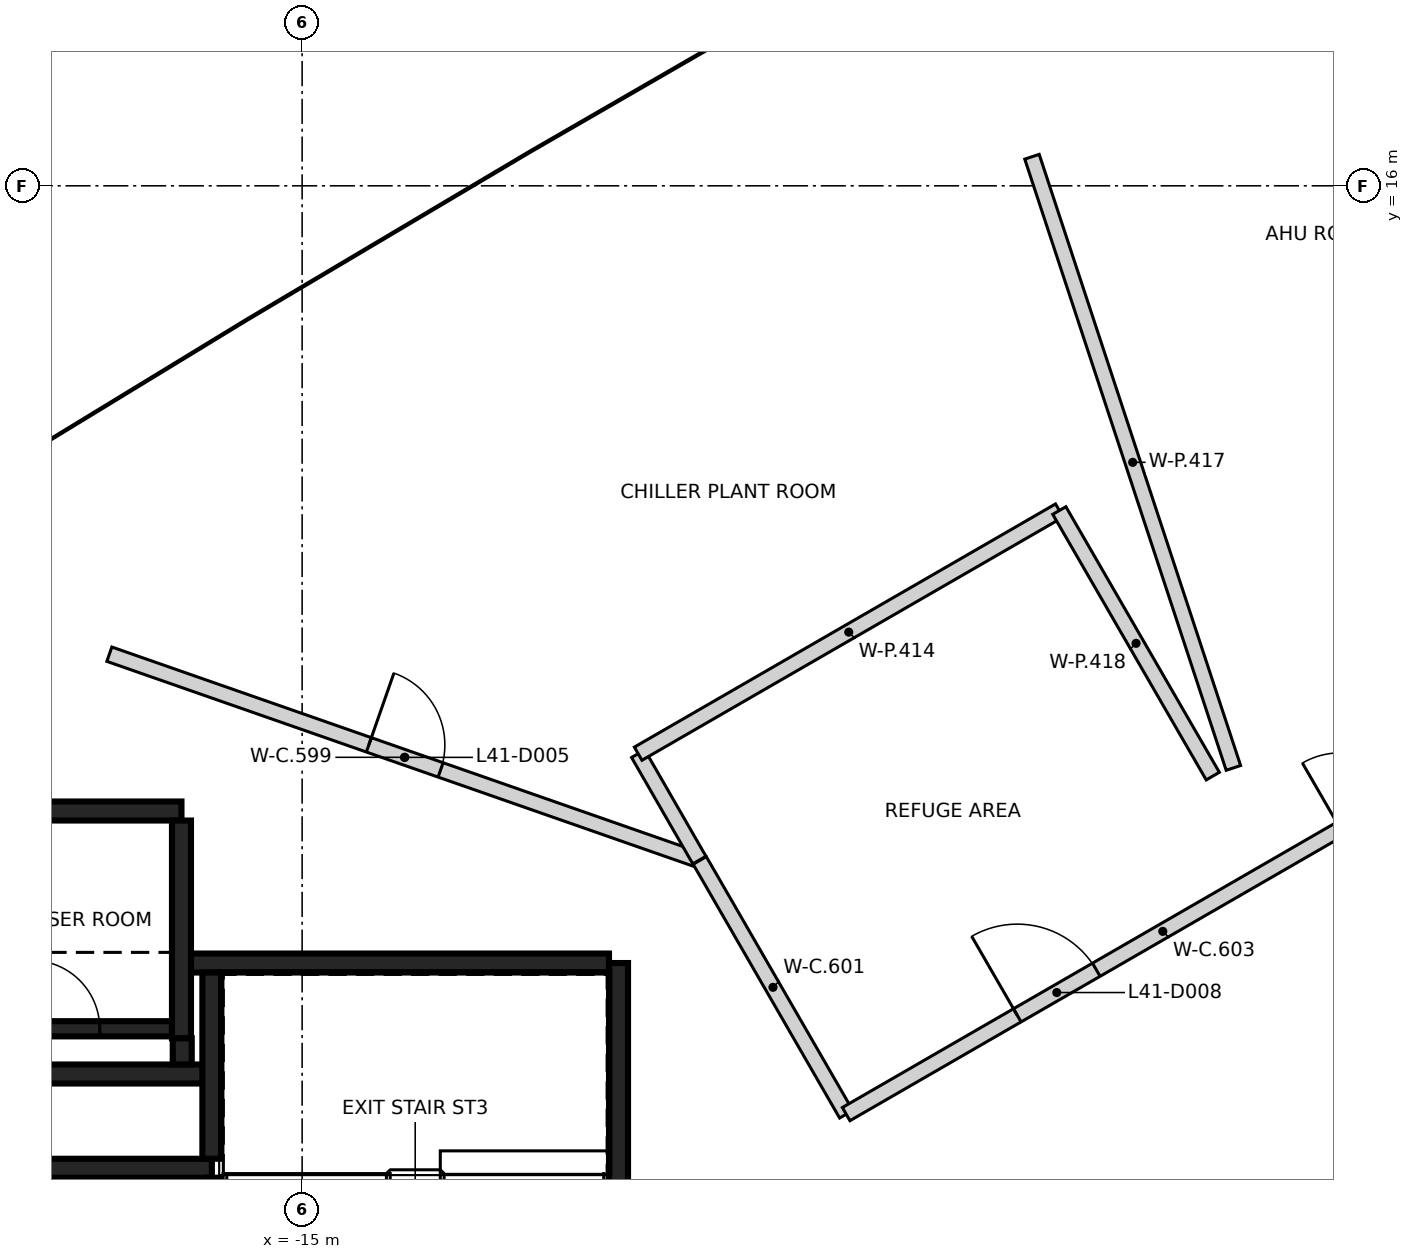
"""IFC4 building model, lengths in metres.
Left out: names, types, materials, properties, quantities, classifications, styles, units other than length and angle.
Written with IfcOpenShell. Run it as: python <this file> out.ifc"""

import sys

from ifc_helpers import new_model, si_unit, direction, frame, frame_2d, origin, place, context, subcontext, project, spatial, rectangle, extrude, element, fill, save


model = new_model("IFC4")
c1 = context("Model", 3, precision=1e-05, world=origin(), true_north=direction((0.0, 1.0)))
c2 = subcontext(c1, "Body", "Model", "MODEL_VIEW")
j1 = project(units=[si_unit("LENGTHUNIT", "METRE"), si_unit("PLANEANGLEUNIT", "RADIAN")], contexts=[c1])
p1 = place(None, origin())
s1 = spatial("IfcSite", under=j1, at=p1, CompositionType="ELEMENT")
p2 = place(p1, origin())
s2 = spatial("IfcBuilding", under=s1, at=p2, CompositionType="ELEMENT")
p3 = place(p2, frame((0.0, 0.0, 164.8)))
s3 = spatial("IfcBuildingStorey", under=s2, at=p3, CompositionType="ELEMENT", Elevation=164.8)
p4 = place(p3, frame((-10.837, 5.775, 0.0), z_axis=(0.0, 0.0, 1.0), x_axis=(0.0, -1.0, 0.0)))
e1 = element("IfcWall", 1, at=p4, inside=s3, PredefinedType="SHEAR", context=c2, shape_type="SweptSolid", body=[
    extrude(rectangle(XDim=11.55, YDim=0.25, at=frame_2d((5.775, 0.0))), origin(), (0.0, 0.0, 1.0), 4.45),
])
p5 = place(p4, frame((10.025, 0.0, 0.0)))
e2 = element("IfcOpeningElement", 2, at=p5, cuts=e1, PredefinedType="OPENING", context=c2, shape_type="SweptSolid", body=[
    extrude(rectangle(XDim=1.2, YDim=2.1, at=frame_2d((0.6, 1.05))), frame((0.0, 0.135, 0.0), z_axis=(0.0, -1.0, 0.0), x_axis=(1.0, 0.0, 0.0)), (0.0, 0.0, 1.0), 0.27),
])
p6 = place(p4, frame((8.725, 0.0, 0.0)))
e3 = element("IfcOpeningElement", 3, at=p6, cuts=e1, PredefinedType="OPENING", context=c2, shape_type="SweptSolid", body=[
    extrude(rectangle(XDim=1.2, YDim=2.1, at=frame_2d((0.6, 1.05))), frame((0.0, 0.135, 0.0), z_axis=(0.0, -1.0, 0.0), x_axis=(1.0, 0.0, 0.0)), (0.0, 0.0, 1.0), 0.27),
])
p7 = place(p3, frame((-16.472, 5.775, 0.0), z_axis=(0.0, 0.0, 1.0), x_axis=(1.0, 0.0, 0.0)))
e4 = element("IfcWall", 4, at=p7, inside=s3, PredefinedType="SHEAR", context=c2, shape_type="SweptSolid", body=[
    extrude(rectangle(XDim=5.51, YDim=0.25, at=frame_2d((2.755, 0.0))), origin(), (0.0, 0.0, 1.0), 4.45),
])
p8 = place(p3, frame((-19.387, 3.075, 0.0), z_axis=(0.0, 0.0, 1.0), x_axis=(1.0, 0.0, 0.0)))
e5 = element("IfcWall", 5, at=p8, inside=s3, PredefinedType="SHEAR", context=c2, shape_type="SweptSolid", body=[
    extrude(rectangle(XDim=3.2, YDim=0.25, at=frame_2d((1.6, 0.0))), origin(), (0.0, 0.0, 1.0), 4.45),
])
p9 = place(p3, frame((-19.637, 7.775, 0.0), z_axis=(0.0, 0.0, 1.0), x_axis=(1.0, 0.0, 0.0)))
e6 = element("IfcWall", 6, at=p9, inside=s3, PredefinedType="SHEAR", context=c2, shape_type="SweptSolid", body=[
    extrude(rectangle(XDim=3.05, YDim=0.25, at=frame_2d((1.525, 0.0))), origin(), (0.0, 0.0, 1.0), 4.45),
])
p10 = place(p3, frame((-16.587, 7.65, 0.0), z_axis=(0.0, 0.0, 1.0), x_axis=(0.0, -1.0, 0.0)))
e7 = element("IfcWall", 7, at=p10, inside=s3, PredefinedType="SHEAR", context=c2, shape_type="SweptSolid", body=[
    extrude(rectangle(XDim=2.865, YDim=0.25, at=frame_2d((1.432, 0.0))), origin(), (0.0, 0.0, 1.0), 4.45),
])
p11 = place(p3, frame((-16.302, 4.315, 0.0), z_axis=(0.0, 0.0, 1.0), x_axis=(-1.0, 0.0, 0.0)))
e8 = element("IfcWall", 8, at=p11, inside=s3, PredefinedType="SHEAR", context=c2, shape_type="SweptSolid", body=[
    extrude(rectangle(XDim=3.085, YDim=0.25, at=frame_2d((1.542, 0.0))), origin(), (0.0, 0.0, 1.0), 4.45),
])
p12 = place(p3, frame((-16.187, 3.2, 0.0), z_axis=(0.0, 0.0, 1.0), x_axis=(0.0, 1.0, 0.0)))
e9 = element("IfcWall", 9, at=p12, inside=s3, PredefinedType="SHEAR", context=c2, shape_type="SweptSolid", body=[
    extrude(rectangle(XDim=2.449, YDim=0.25, at=frame_2d((1.225, 0.0))), origin(), (0.0, 0.0, 1.0), 4.45),
])
p13 = place(p3, frame((-16.577, 4.785, 0.0), z_axis=(0.0, 0.0, 1.0), x_axis=(0.0, -1.0, 0.0)))
e10 = element("IfcWall", 10, at=p13, inside=s3, PredefinedType="SHEAR", context=c2, shape_type="SweptSolid", body=[
    extrude(rectangle(XDim=0.344, YDim=0.25, at=frame_2d((0.172, 0.0))), origin(), (0.0, 0.0, 1.0), 4.45),
])
p14 = place(p3, frame((-16.162, 2.951, 0.0), z_axis=(0.0, 0.0, 1.0), x_axis=(0.0, -1.0, 0.0)))
e11 = element("IfcWall", 11, at=p14, inside=s3, PredefinedType="SHEAR", context=c2, shape_type="SweptSolid", body=[
    extrude(rectangle(XDim=5.851, YDim=0.2, at=frame_2d((2.925, 0.0))), origin(), (0.0, 0.0, 1.0), 4.45),
])
p15 = place(p3, frame((-19.511, 4.91, 0.0), z_axis=(0.0, 0.0, 1.0), x_axis=(1.0, 0.0, 0.0)))
e12 = element("IfcWall", 12, at=p15, inside=s3, PredefinedType="SHEAR", context=c2, shape_type="SweptSolid", body=[
    extrude(rectangle(XDim=2.798, YDim=0.2, at=frame_2d((1.399, 0.0))), origin(), (0.0, 0.0, 1.0), 4.45),
])
p16 = place(p15, frame((0.949, 0.0, 0.0)))
e13 = element("IfcOpeningElement", 13, at=p16, cuts=e12, PredefinedType="OPENING", context=c2, shape_type="SweptSolid", body=[
    extrude(rectangle(XDim=0.9, YDim=2.1, at=frame_2d((0.45, 1.05))), frame((0.0, 0.11, 0.0), z_axis=(0.0, -1.0, 0.0), x_axis=(1.0, 0.0, 0.0)), (0.0, 0.0, 1.0), 0.22),
])
p17 = place(p3, frame((-17.536, 9.838, 0.0), z_axis=(0.0, 0.0, 1.0), x_axis=(0.944066821922, -0.329754205048, 0.0)))
e14 = element("IfcWall", 14, at=p17, inside=s3, PredefinedType="PARTITIONING", context=c2, shape_type="SweptSolid", body=[
    extrude(rectangle(XDim=8.227, YDim=0.2, at=frame_2d((4.114, 0.0))), origin(), (0.0, 0.0, 1.0), 4.45),
])
p18 = place(p17, frame((3.616, 0.0, 0.0)))
e15 = element("IfcOpeningElement", 15, at=p18, cuts=e14, PredefinedType="OPENING", context=c2, shape_type="SweptSolid", body=[
    extrude(rectangle(XDim=1.0, YDim=2.1, at=frame_2d((0.5, 1.05))), frame((0.0, 0.11, 0.0), z_axis=(0.0, -1.0, 0.0), x_axis=(1.0, 0.0, 0.0)), (0.0, 0.0, 1.0), 0.22),
])
p19 = place(p3, frame((-9.769, 7.125, 0.0), z_axis=(0.0, 0.0, 1.0), x_axis=(0.499837575736, -0.866119159171, 0.0)))
e16 = element("IfcWall", 16, at=p19, inside=s3, PredefinedType="PARTITIONING", context=c2, shape_type="SweptSolid", body=[
    extrude(rectangle(XDim=3.855, YDim=0.2, at=frame_2d((1.928, 0.0))), origin(), (0.0, 0.0, 1.0), 4.45),
])
p20 = place(p3, frame((-7.843, 3.787, 0.0), z_axis=(0.0, 0.0, 1.0), x_axis=(0.866104875001, 0.499862326546, 0.0)))
e17 = element("IfcWall", 17, at=p20, inside=s3, PredefinedType="PARTITIONING", context=c2, shape_type="SweptSolid", body=[
    extrude(rectangle(XDim=9.62, YDim=0.2, at=frame_2d((4.81, 0.0))), origin(), (0.0, 0.0, 1.0), 4.45),
])
p21 = place(p20, frame((7.508, 0.0, 0.0)))
e18 = element("IfcOpeningElement", 18, at=p21, cuts=e17, PredefinedType="OPENING", context=c2, shape_type="SweptSolid", body=[
    extrude(rectangle(XDim=1.0, YDim=2.1, at=frame_2d((0.5, 1.05))), frame((0.0, 0.11, 0.0), z_axis=(0.0, -1.0, 0.0), x_axis=(1.0, 0.0, 0.0)), (0.0, 0.0, 1.0), 0.22),
])
p22 = place(p20, frame((2.6, 0.0, 0.0)))
e19 = element("IfcOpeningElement", 19, at=p22, cuts=e17, PredefinedType="OPENING", context=c2, shape_type="SweptSolid", body=[
    extrude(rectangle(XDim=1.2, YDim=2.1, at=frame_2d((0.6, 1.05))), frame((0.0, 0.11, 0.0), z_axis=(0.0, -1.0, 0.0), x_axis=(1.0, 0.0, 0.0)), (0.0, 0.0, 1.0), 0.22),
])
p23 = place(p3, frame((-10.579, 8.529, 0.0), z_axis=(0.0, 0.0, 1.0), x_axis=(0.498775127666, -0.866731430157, 0.0)))
e20 = element("IfcWall", 20, at=p23, inside=s3, PredefinedType="PARTITIONING", context=c2, shape_type="SweptSolid", body=[
    extrude(rectangle(XDim=1.614, YDim=0.2, at=frame_2d((0.807, 0.0))), origin(), (0.0, 0.0, 1.0), 4.45),
])
p24 = place(p3, frame((-10.579, 8.529, 0.0), z_axis=(0.0, 0.0, 1.0), x_axis=(0.866034354261, 0.499984496999, 0.0)))
e21 = element("IfcWall", 21, at=p24, inside=s3, PredefinedType="PARTITIONING", context=c2, shape_type="SweptSolid", body=[
    extrude(rectangle(XDim=6.398, YDim=0.2, at=frame_2d((3.199, 0.0))), origin(), (0.0, 0.0, 1.0), 4.45),
])
p25 = place(p3, frame((-5.398, 16.383, 0.0), z_axis=(0.0, 0.0, 1.0), x_axis=(0.312981612856, -0.949759185275, 0.0)))
e22 = element("IfcWall", 22, at=p25, inside=s3, PredefinedType="PARTITIONING", context=c2, shape_type="SweptSolid", body=[
    extrude(rectangle(XDim=8.466, YDim=0.2, at=frame_2d((4.233, 0.0))), origin(), (0.0, 0.0, 1.0), 4.45),
])
p26 = place(p3, frame((-5.038, 11.728, 0.0), z_axis=(0.0, 0.0, 1.0), x_axis=(0.500315898403, -0.86584294292, 0.0)))
e23 = element("IfcWall", 23, at=p26, inside=s3, PredefinedType="PARTITIONING", context=c2, shape_type="SweptSolid", body=[
    extrude(rectangle(XDim=4.036, YDim=0.2, at=frame_2d((2.018, 0.0))), origin(), (0.0, 0.0, 1.0), 4.45),
])
p27 = place(p16, origin())
e24 = element("IfcDoor", 24, at=p27, inside=s3, OperationType="SINGLE_SWING_LEFT", PredefinedType="DOOR", context=c2, shape_type="SweptSolid", body=[
    extrude(rectangle(XDim=0.9, YDim=2.1, at=frame_2d((0.45, 1.05))), frame((0.0, 0.025, 0.0), z_axis=(0.0, -1.0, 0.0), x_axis=(1.0, 0.0, 0.0)), (0.0, 0.0, 1.0), 0.05),
])
fill(e13, e24)
p28 = place(p18, origin())
e25 = element("IfcDoor", 25, at=p28, inside=s3, OperationType="SINGLE_SWING_LEFT", PredefinedType="DOOR", context=c2, shape_type="SweptSolid", body=[
    extrude(rectangle(XDim=1.0, YDim=2.1, at=frame_2d((0.5, 1.05))), frame((0.0, 0.025, 0.0), z_axis=(0.0, -1.0, 0.0), x_axis=(1.0, 0.0, 0.0)), (0.0, 0.0, 1.0), 0.05),
])
fill(e15, e25)
p29 = place(p22, origin())
e26 = element("IfcDoor", 26, at=p29, inside=s3, OperationType="SINGLE_SWING_LEFT", PredefinedType="DOOR", context=c2, shape_type="SweptSolid", body=[
    extrude(rectangle(XDim=1.2, YDim=2.1, at=frame_2d((0.6, 1.05))), frame((0.0, 0.025, 0.0), z_axis=(0.0, -1.0, 0.0), x_axis=(1.0, 0.0, 0.0)), (0.0, 0.0, 1.0), 0.05),
])
fill(e19, e26)
save(model, sys.argv[1])
